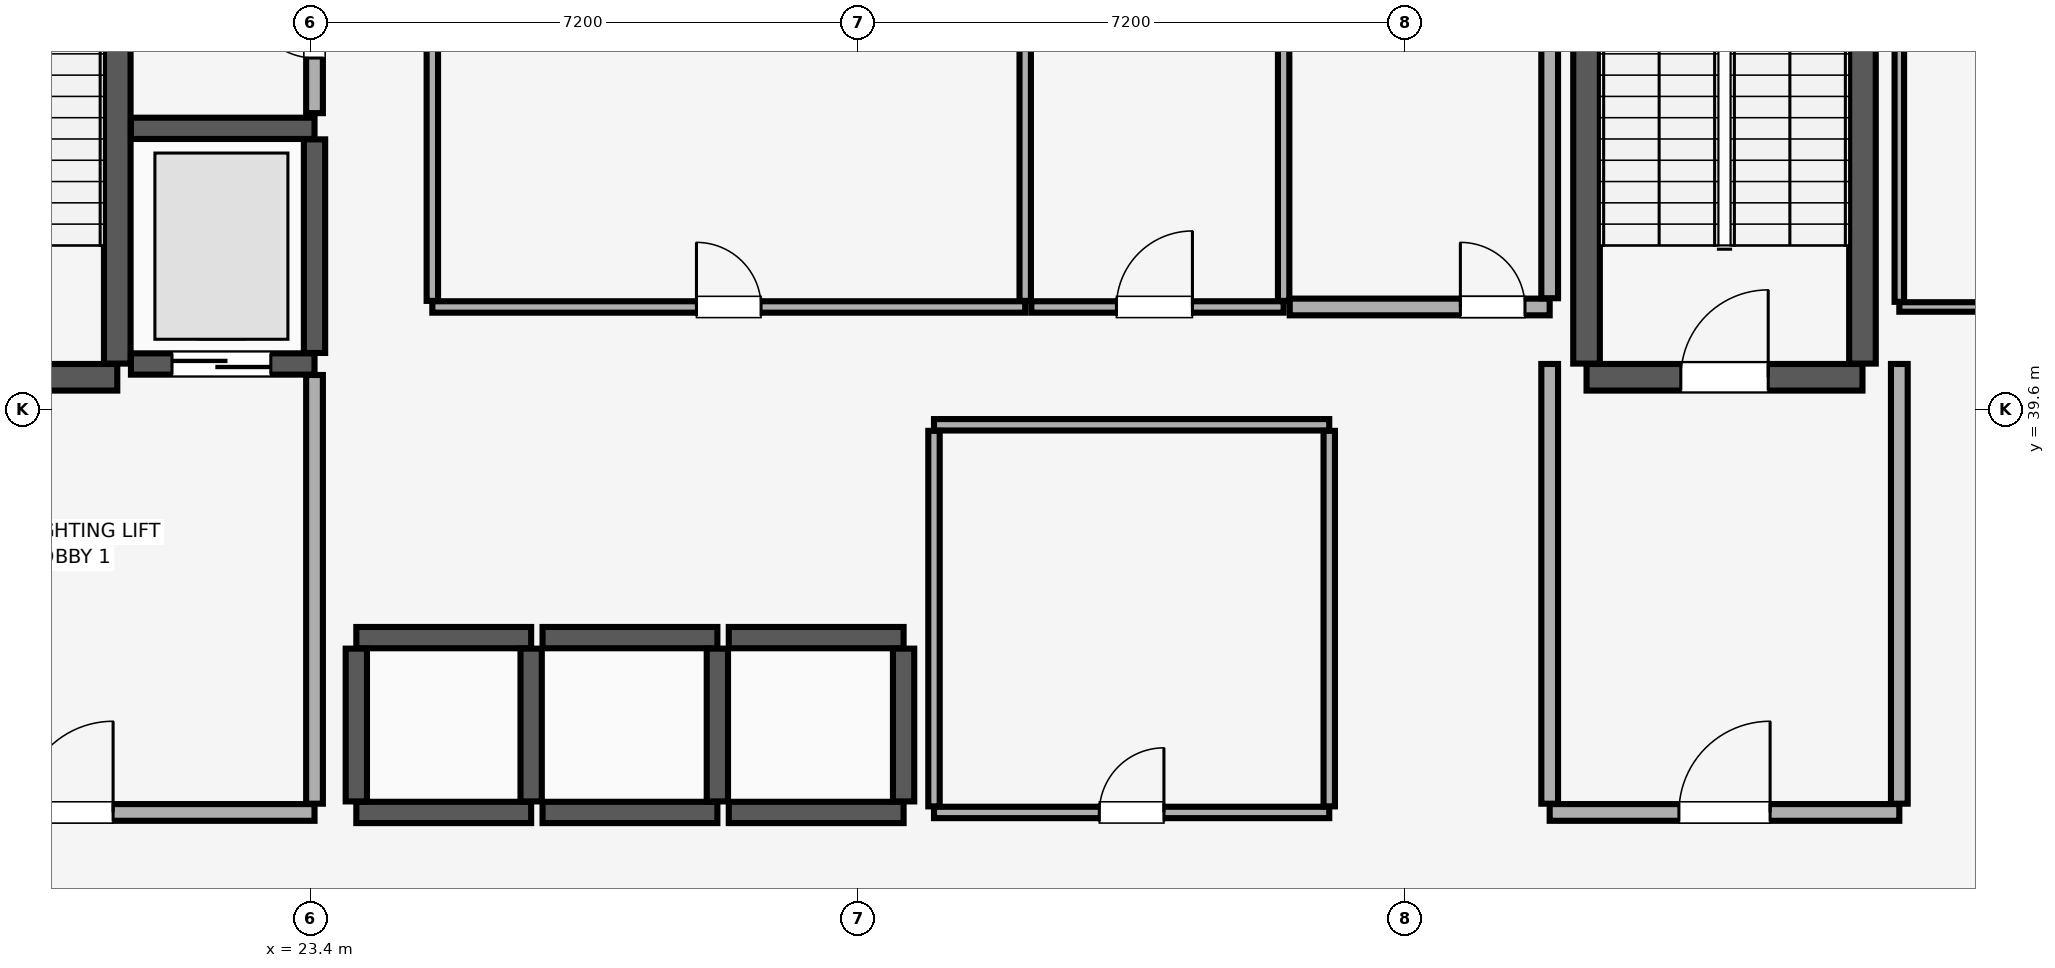
"""IFC4 building model, lengths in metres.
Left out: names, types, materials, properties, quantities, classifications, styles, units other than length and angle.
Written with IfcOpenShell. Run it as: python <this file> out.ifc"""

import sys

from ifc_helpers import new_model, si_unit, direction, frame, frame_2d, origin, place, context, subcontext, project, spatial, rectangle, extrude, element, fill, save


model = new_model("IFC4")
c1 = context("Model", 3, precision=1e-05, world=origin(), true_north=direction((0.0, 1.0)))
c2 = subcontext(c1, "Body", "Model", "MODEL_VIEW")
j1 = project(units=[si_unit("LENGTHUNIT", "METRE"), si_unit("PLANEANGLEUNIT", "RADIAN")], contexts=[c1])
p1 = place(None, origin())
s1 = spatial("IfcSite", under=j1, at=p1, CompositionType="ELEMENT")
p2 = place(p1, origin())
s2 = spatial("IfcBuilding", under=s1, at=p2, CompositionType="ELEMENT")
p3 = place(p2, frame((0.0, 0.0, 135.35)))
s3 = spatial("IfcBuildingStorey", under=s2, at=p3, CompositionType="ELEMENT", Elevation=135.35)
p4 = place(p3, frame((16.655, 40.025, 0.0), z_axis=(0.0, 0.0, 1.0), x_axis=(1.0, 0.0, 0.0)))
e1 = element("IfcWall", 1, at=p4, inside=s3, PredefinedType="SHEAR", context=c2, shape_type="SweptSolid", body=[
    extrude(rectangle(XDim=4.2, YDim=0.35, at=frame_2d((2.1, 0.0))), origin(), (0.0, 0.0, 1.0), 3.56),
])
p5 = place(p4, frame((1.81, 0.0, 0.0)))
e2 = element("IfcOpeningElement", 2, at=p5, cuts=e1, PredefinedType="OPENING", context=c2, shape_type="SweptSolid", body=[
    extrude(rectangle(XDim=1.15, YDim=2.15, at=frame_2d((0.575, 1.075))), frame((0.0, 0.185, 0.0), z_axis=(0.0, -1.0, 0.0), x_axis=(1.0, 0.0, 0.0)), (0.0, 0.0, 1.0), 0.37),
])
p6 = place(p3, frame((20.855, 40.205, 0.0), z_axis=(0.0, 0.0, 1.0), x_axis=(0.0, 1.0, 0.0)))
e3 = element("IfcWall", 3, at=p6, inside=s3, PredefinedType="SHEAR", context=c2, shape_type="SweptSolid", body=[
    extrude(rectangle(XDim=8.09, YDim=0.35, at=frame_2d((4.045, 0.0))), origin(), (0.0, 0.0, 1.0), 3.56),
])
p7 = place(p3, frame((40.185, 40.025, 0.0), z_axis=(0.0, 0.0, 1.0), x_axis=(1.0, 0.0, 0.0)))
e4 = element("IfcWall", 4, at=p7, inside=s3, PredefinedType="SHEAR", context=c2, shape_type="SweptSolid", body=[
    extrude(rectangle(XDim=3.63, YDim=0.35, at=frame_2d((1.815, 0.0))), origin(), (0.0, 0.0, 1.0), 3.56),
])
p8 = place(p7, frame((1.24, 0.0, 0.0)))
e5 = element("IfcOpeningElement", 5, at=p8, cuts=e4, PredefinedType="OPENING", context=c2, shape_type="SweptSolid", body=[
    extrude(rectangle(XDim=1.15, YDim=2.15, at=frame_2d((0.575, 1.075))), frame((0.0, 0.185, 0.0), z_axis=(0.0, -1.0, 0.0), x_axis=(1.0, 0.0, 0.0)), (0.0, 0.0, 1.0), 0.37),
])
for number, where, z_axis, x_axis in (
    (6, (40.185, 40.205, 0.0), (0.0, 0.0, 1.0), (0.0, 1.0, 0.0)),
    (7, (43.815, 40.205, 0.0), (0.0, 0.0, 1.0), (0.0, 1.0, 0.0)),
):
    element("IfcWall", number, at=place(p3, frame(where, z_axis=z_axis, x_axis=x_axis)), inside=s3, PredefinedType="SHEAR", context=c2, shape_type="SweptSolid", body=[
        extrude(rectangle(XDim=8.09, YDim=0.35, at=frame_2d((4.045, 0.0))), origin(), (0.0, 0.0, 1.0), 3.56),
    ])
for number, where, z_axis, x_axis in (
    (8, (24.0, 34.3, 0.0), (0.0, 0.0, 1.0), (1.0, 0.0, 0.0)),
    (9, (24.0, 36.6, 0.0), (0.0, 0.0, 1.0), (1.0, 0.0, 0.0)),
):
    element("IfcWall", number, at=place(p3, frame(where, z_axis=z_axis, x_axis=x_axis)), inside=s3, PredefinedType="SHEAR", context=c2, shape_type="SweptSolid", body=[
        extrude(rectangle(XDim=2.3, YDim=0.28, at=frame_2d((1.15, 0.0))), origin(), (0.0, 0.0, 1.0), 3.56),
    ])
for number, where, z_axis, x_axis in (
    (10, (24.0, 34.445, 0.0), (0.0, 0.0, 1.0), (0.0, 1.0, 0.0)),
    (11, (26.3, 34.445, 0.0), (0.0, 0.0, 1.0), (0.0, 1.0, 0.0)),
):
    element("IfcWall", number, at=place(p3, frame(where, z_axis=z_axis, x_axis=x_axis)), inside=s3, PredefinedType="SHEAR", context=c2, shape_type="SweptSolid", body=[
        extrude(rectangle(XDim=2.01, YDim=0.28, at=frame_2d((1.005, 0.0))), origin(), (0.0, 0.0, 1.0), 3.56),
    ])
for number, where, z_axis, x_axis in (
    (12, (26.45, 34.3, 0.0), (0.0, 0.0, 1.0), (1.0, 0.0, 0.0)),
    (13, (26.45, 36.6, 0.0), (0.0, 0.0, 1.0), (1.0, 0.0, 0.0)),
):
    element("IfcWall", number, at=place(p3, frame(where, z_axis=z_axis, x_axis=x_axis)), inside=s3, PredefinedType="SHEAR", context=c2, shape_type="SweptSolid", body=[
        extrude(rectangle(XDim=2.3, YDim=0.28, at=frame_2d((1.15, 0.0))), origin(), (0.0, 0.0, 1.0), 3.56),
    ])
p9 = place(p3, frame((28.75, 34.445, 0.0), z_axis=(0.0, 0.0, 1.0), x_axis=(0.0, 1.0, 0.0)))
e14 = element("IfcWall", 14, at=p9, inside=s3, PredefinedType="SHEAR", context=c2, shape_type="SweptSolid", body=[
    extrude(rectangle(XDim=2.01, YDim=0.28, at=frame_2d((1.005, 0.0))), origin(), (0.0, 0.0, 1.0), 3.56),
])
for number, where, z_axis, x_axis in (
    (15, (28.9, 34.3, 0.0), (0.0, 0.0, 1.0), (1.0, 0.0, 0.0)),
    (16, (28.9, 36.6, 0.0), (0.0, 0.0, 1.0), (1.0, 0.0, 0.0)),
):
    element("IfcWall", number, at=place(p3, frame(where, z_axis=z_axis, x_axis=x_axis)), inside=s3, PredefinedType="SHEAR", context=c2, shape_type="SweptSolid", body=[
        extrude(rectangle(XDim=2.3, YDim=0.28, at=frame_2d((1.15, 0.0))), origin(), (0.0, 0.0, 1.0), 3.56),
    ])
p10 = place(p3, frame((31.2, 34.445, 0.0), z_axis=(0.0, 0.0, 1.0), x_axis=(0.0, 1.0, 0.0)))
e17 = element("IfcWall", 17, at=p10, inside=s3, PredefinedType="SHEAR", context=c2, shape_type="SweptSolid", body=[
    extrude(rectangle(XDim=2.01, YDim=0.28, at=frame_2d((1.005, 0.0))), origin(), (0.0, 0.0, 1.0), 3.56),
])
p11 = place(p3, frame((21.035, 40.2, 0.0), z_axis=(0.0, 0.0, 1.0), x_axis=(1.0, 0.0, 0.0)))
e18 = element("IfcWall", 18, at=p11, inside=s3, PredefinedType="SHEAR", context=c2, shape_type="SweptSolid", body=[
    extrude(rectangle(XDim=2.415, YDim=0.28, at=frame_2d((1.208, 0.0))), origin(), (0.0, 0.0, 1.0), 3.56),
])
p12 = place(p11, frame((0.54, 0.0, 0.0)))
e19 = element("IfcOpeningElement", 19, at=p12, cuts=e18, PredefinedType="OPENING", context=c2, shape_type="SweptSolid", body=[
    extrude(rectangle(XDim=1.3, YDim=2.3, at=frame_2d((0.65, 1.15))), frame((0.0, 0.15, 0.0), z_axis=(0.0, -1.0, 0.0), x_axis=(1.0, 0.0, 0.0)), (0.0, 0.0, 1.0), 0.3),
])
p13 = place(p3, frame((21.035, 43.3, 0.0), z_axis=(0.0, 0.0, 1.0), x_axis=(1.0, 0.0, 0.0)))
e20 = element("IfcWall", 20, at=p13, inside=s3, PredefinedType="SHEAR", context=c2, shape_type="SweptSolid", body=[
    extrude(rectangle(XDim=2.415, YDim=0.28, at=frame_2d((1.208, 0.0))), origin(), (0.0, 0.0, 1.0), 3.56),
])
p14 = place(p3, frame((23.45, 40.345, 0.0), z_axis=(0.0, 0.0, 1.0), x_axis=(0.0, 1.0, 0.0)))
e21 = element("IfcWall", 21, at=p14, inside=s3, PredefinedType="SHEAR", context=c2, shape_type="SweptSolid", body=[
    extrude(rectangle(XDim=2.81, YDim=0.28, at=frame_2d((1.405, 0.0))), origin(), (0.0, 0.0, 1.0), 3.56),
])
p15 = place(p3, frame((17.4, 34.3, 0.0), z_axis=(0.0, 0.0, 1.0), x_axis=(1.0, 0.0, 0.0)))
e22 = element("IfcWall", 22, at=p15, inside=s3, PredefinedType="PARTITIONING", context=c2, shape_type="SweptSolid", body=[
    extrude(rectangle(XDim=6.05, YDim=0.22, at=frame_2d((3.025, 0.0))), origin(), (0.0, 0.0, 1.0), 3.56),
])
p16 = place(p15, frame((2.2, 0.0, 0.0)))
e23 = element("IfcOpeningElement", 23, at=p16, cuts=e22, PredefinedType="OPENING", context=c2, shape_type="SweptSolid", body=[
    extrude(rectangle(XDim=1.2, YDim=2.15, at=frame_2d((0.6, 1.075))), frame((0.0, 0.12, 0.0), z_axis=(0.0, -1.0, 0.0), x_axis=(1.0, 0.0, 0.0)), (0.0, 0.0, 1.0), 0.24),
])
p17 = place(p3, frame((23.45, 34.415, 0.0), z_axis=(0.0, 0.0, 1.0), x_axis=(0.0, 1.0, 0.0)))
e24 = element("IfcWall", 24, at=p17, inside=s3, PredefinedType="PARTITIONING", context=c2, shape_type="SweptSolid", body=[
    extrude(rectangle(XDim=5.64, YDim=0.22, at=frame_2d((2.82, 0.0))), origin(), (0.0, 0.0, 1.0), 3.56),
])
p18 = place(p3, frame((39.7, 34.3, 0.0), z_axis=(0.0, 0.0, 1.0), x_axis=(1.0, 0.0, 0.0)))
e25 = element("IfcWall", 25, at=p18, inside=s3, PredefinedType="PARTITIONING", context=c2, shape_type="SweptSolid", body=[
    extrude(rectangle(XDim=4.6, YDim=0.22, at=frame_2d((2.3, 0.0))), origin(), (0.0, 0.0, 1.0), 3.56),
])
p19 = place(p18, frame((1.7, 0.0, 0.0)))
e26 = element("IfcOpeningElement", 26, at=p19, cuts=e25, PredefinedType="OPENING", context=c2, shape_type="SweptSolid", body=[
    extrude(rectangle(XDim=1.2, YDim=2.15, at=frame_2d((0.6, 1.075))), frame((0.0, 0.12, 0.0), z_axis=(0.0, -1.0, 0.0), x_axis=(1.0, 0.0, 0.0)), (0.0, 0.0, 1.0), 0.24),
])
for number, where, z_axis, x_axis in (
    (27, (39.7, 34.415, 0.0), (0.0, 0.0, 1.0), (0.0, 1.0, 0.0)),
    (28, (44.3, 34.415, 0.0), (0.0, 0.0, 1.0), (0.0, 1.0, 0.0)),
):
    element("IfcWall", number, at=place(p3, frame(where, z_axis=z_axis, x_axis=x_axis)), inside=s3, PredefinedType="PARTITIONING", context=c2, shape_type="SweptSolid", body=[
        extrude(rectangle(XDim=5.785, YDim=0.22, at=frame_2d((2.893, 0.0))), origin(), (0.0, 0.0, 1.0), 3.56),
    ])
p20 = place(p3, frame((23.45, 43.5, 0.0), z_axis=(0.0, 0.0, 1.0), x_axis=(0.0, 1.0, 0.0)))
e29 = element("IfcWall", 29, at=p20, inside=s3, PredefinedType="PARTITIONING", context=c2, shape_type="SweptSolid", body=[
    extrude(rectangle(XDim=2.235, YDim=0.22, at=frame_2d((1.118, 0.0))), origin(), (0.0, 0.0, 1.0), 3.56),
])
p21 = place(p20, frame((0.725, 0.0, 0.0)))
e30 = element("IfcOpeningElement", 30, at=p21, cuts=e29, PredefinedType="OPENING", context=c2, shape_type="SweptSolid", body=[
    extrude(rectangle(XDim=0.85, YDim=2.1, at=frame_2d((0.425, 1.05))), frame((0.0, 0.12, 0.0), z_axis=(0.0, -1.0, 0.0), x_axis=(1.0, 0.0, 0.0)), (0.0, 0.0, 1.0), 0.24),
])
p22 = place(p3, frame((31.6, 34.3, 0.0), z_axis=(0.0, 0.0, 1.0), x_axis=(1.0, 0.0, 0.0)))
e31 = element("IfcWall", 31, at=p22, inside=s3, PredefinedType="PARTITIONING", context=c2, shape_type="SweptSolid", body=[
    extrude(rectangle(XDim=5.2, YDim=0.15, at=frame_2d((2.6, 0.0))), origin(), (0.0, 0.0, 1.0), 3.56),
])
p23 = place(p22, frame((2.175, 0.0, 0.0)))
e32 = element("IfcOpeningElement", 32, at=p23, cuts=e31, PredefinedType="OPENING", context=c2, shape_type="SweptSolid", body=[
    extrude(rectangle(XDim=0.85, YDim=2.1, at=frame_2d((0.425, 1.05))), frame((0.0, 0.085, 0.0), z_axis=(0.0, -1.0, 0.0), x_axis=(1.0, 0.0, 0.0)), (0.0, 0.0, 1.0), 0.17),
])
p24 = place(p3, frame((31.6, 39.4, 0.0), z_axis=(0.0, 0.0, 1.0), x_axis=(1.0, 0.0, 0.0)))
e33 = element("IfcWall", 33, at=p24, inside=s3, PredefinedType="PARTITIONING", context=c2, shape_type="SweptSolid", body=[
    extrude(rectangle(XDim=5.2, YDim=0.15, at=frame_2d((2.6, 0.0))), origin(), (0.0, 0.0, 1.0), 3.56),
])
for number, where, z_axis, x_axis in (
    (34, (31.6, 34.38, 0.0), (0.0, 0.0, 1.0), (0.0, 1.0, 0.0)),
    (35, (36.8, 34.38, 0.0), (0.0, 0.0, 1.0), (0.0, 1.0, 0.0)),
):
    element("IfcWall", number, at=place(p3, frame(where, z_axis=z_axis, x_axis=x_axis)), inside=s3, PredefinedType="PARTITIONING", context=c2, shape_type="SweptSolid", body=[
        extrude(rectangle(XDim=4.94, YDim=0.15, at=frame_2d((2.47, 0.0))), origin(), (0.0, 0.0, 1.0), 3.56),
    ])
p25 = place(p3, frame((25.0, 40.95, 0.0), z_axis=(0.0, 0.0, 1.0), x_axis=(1.0, 0.0, 0.0)))
e36 = element("IfcWall", 36, at=p25, inside=s3, PredefinedType="PARTITIONING", context=c2, shape_type="SweptSolid", body=[
    extrude(rectangle(XDim=7.8, YDim=0.15, at=frame_2d((3.9, 0.0))), origin(), (0.0, 0.0, 1.0), 3.56),
])
p26 = place(p25, frame((3.475, 0.0, 0.0)))
e37 = element("IfcOpeningElement", 37, at=p26, cuts=e36, PredefinedType="OPENING", context=c2, shape_type="SweptSolid", body=[
    extrude(rectangle(XDim=0.85, YDim=2.1, at=frame_2d((0.425, 1.05))), frame((0.0, 0.085, 0.0), z_axis=(0.0, -1.0, 0.0), x_axis=(1.0, 0.0, 0.0)), (0.0, 0.0, 1.0), 0.17),
])
for number, where, z_axis, x_axis in (
    (38, (25.0, 41.03, 0.0), (0.0, 0.0, 1.0), (0.0, 1.0, 0.0)),
    (39, (32.8, 41.03, 0.0), (0.0, 0.0, 1.0), (0.0, 1.0, 0.0)),
):
    element("IfcWall", number, at=place(p3, frame(where, z_axis=z_axis, x_axis=x_axis)), inside=s3, PredefinedType="PARTITIONING", context=c2, shape_type="SweptSolid", body=[
        extrude(rectangle(XDim=7.82, YDim=0.15, at=frame_2d((3.91, 0.0))), origin(), (0.0, 0.0, 1.0), 3.56),
    ])
p27 = place(p3, frame((32.88, 40.95, 0.0), z_axis=(0.0, 0.0, 1.0), x_axis=(1.0, 0.0, 0.0)))
e40 = element("IfcWall", 40, at=p27, inside=s3, PredefinedType="PARTITIONING", context=c2, shape_type="SweptSolid", body=[
    extrude(rectangle(XDim=3.32, YDim=0.15, at=frame_2d((1.66, 0.0))), origin(), (0.0, 0.0, 1.0), 3.56),
])
p28 = place(p27, frame((1.12, 0.0, 0.0)))
e41 = element("IfcOpeningElement", 41, at=p28, cuts=e40, PredefinedType="OPENING", context=c2, shape_type="SweptSolid", body=[
    extrude(rectangle(XDim=1.0, YDim=2.15, at=frame_2d((0.5, 1.075))), frame((0.0, 0.085, 0.0), z_axis=(0.0, -1.0, 0.0), x_axis=(1.0, 0.0, 0.0)), (0.0, 0.0, 1.0), 0.17),
])
p29 = place(p3, frame((36.2, 41.03, 0.0), z_axis=(0.0, 0.0, 1.0), x_axis=(0.0, 1.0, 0.0)))
e42 = element("IfcWall", 42, at=p29, inside=s3, PredefinedType="PARTITIONING", context=c2, shape_type="SweptSolid", body=[
    extrude(rectangle(XDim=7.82, YDim=0.15, at=frame_2d((3.91, 0.0))), origin(), (0.0, 0.0, 1.0), 3.56),
])
p30 = place(p3, frame((36.28, 40.95, 0.0), z_axis=(0.0, 0.0, 1.0), x_axis=(1.0, 0.0, 0.0)))
e43 = element("IfcWall", 43, at=p30, inside=s3, PredefinedType="PARTITIONING", context=c2, shape_type="SweptSolid", body=[
    extrude(rectangle(XDim=3.42, YDim=0.22, at=frame_2d((1.71, 0.0))), origin(), (0.0, 0.0, 1.0), 3.56),
])
p31 = place(p30, frame((2.245, 0.0, 0.0)))
e44 = element("IfcOpeningElement", 44, at=p31, cuts=e43, PredefinedType="OPENING", context=c2, shape_type="SweptSolid", body=[
    extrude(rectangle(XDim=0.85, YDim=2.1, at=frame_2d((0.425, 1.05))), frame((0.0, 0.12, 0.0), z_axis=(0.0, -1.0, 0.0), x_axis=(1.0, 0.0, 0.0)), (0.0, 0.0, 1.0), 0.24),
])
p32 = place(p3, frame((39.7, 41.065, 0.0), z_axis=(0.0, 0.0, 1.0), x_axis=(0.0, 1.0, 0.0)))
e45 = element("IfcWall", 45, at=p32, inside=s3, PredefinedType="PARTITIONING", context=c2, shape_type="SweptSolid", body=[
    extrude(rectangle(XDim=7.785, YDim=0.22, at=frame_2d((3.893, 0.0))), origin(), (0.0, 0.0, 1.0), 3.56),
])
p33 = place(p3, frame((44.3, 40.95, 0.0), z_axis=(0.0, 0.0, 1.0), x_axis=(1.0, 0.0, 0.0)))
e46 = element("IfcWall", 46, at=p33, inside=s3, PredefinedType="PARTITIONING", context=c2, shape_type="SweptSolid", body=[
    extrude(rectangle(XDim=4.6, YDim=0.125, at=frame_2d((2.3, 0.0))), origin(), (0.0, 0.0, 1.0), 3.56),
])
p34 = place(p33, frame((2.85, 0.0, 0.0)))
e47 = element("IfcOpeningElement", 47, at=p34, cuts=e46, PredefinedType="OPENING", context=c2, shape_type="SweptSolid", body=[
    extrude(rectangle(XDim=0.9, YDim=2.1, at=frame_2d((0.45, 1.05))), frame((0.0, 0.073, 0.0), z_axis=(0.0, -1.0, 0.0), x_axis=(1.0, 0.0, 0.0)), (0.0, 0.0, 1.0), 0.145),
])
p35 = place(p3, frame((44.3, 41.018, 0.0), z_axis=(0.0, 0.0, 1.0), x_axis=(0.0, 1.0, 0.0)))
e48 = element("IfcWall", 48, at=p35, inside=s3, PredefinedType="PARTITIONING", context=c2, shape_type="SweptSolid", body=[
    extrude(rectangle(XDim=3.515, YDim=0.125, at=frame_2d((1.757, 0.0))), origin(), (0.0, 0.0, 1.0), 3.56),
])
p36 = place(p8, origin())
e49 = element("IfcDoor", 49, at=p36, inside=s3, OperationType="SINGLE_SWING_RIGHT", PredefinedType="DOOR", context=c2, shape_type="SweptSolid", body=[
    extrude(rectangle(XDim=1.15, YDim=2.15, at=frame_2d((0.575, 1.075))), frame((0.0, 0.025, 0.0), z_axis=(0.0, -1.0, 0.0), x_axis=(1.0, 0.0, 0.0)), (0.0, 0.0, 1.0), 0.05),
])
fill(e5, e49)
p37 = place(p12, origin())
e50 = element("IfcDoor", 50, at=p37, inside=s3, OperationType="DOUBLE_DOOR_SLIDING", PredefinedType="DOOR", context=c2, shape_type="SweptSolid", body=[
    extrude(rectangle(XDim=1.3, YDim=2.3, at=frame_2d((0.65, 1.15))), frame((0.0, 0.025, 0.0), z_axis=(0.0, -1.0, 0.0), x_axis=(1.0, 0.0, 0.0)), (0.0, 0.0, 1.0), 0.05),
])
fill(e19, e50)
p38 = place(p16, origin())
e51 = element("IfcDoor", 51, at=p38, inside=s3, OperationType="SINGLE_SWING_RIGHT", PredefinedType="DOOR", context=c2, shape_type="SweptSolid", body=[
    extrude(rectangle(XDim=1.2, YDim=2.15, at=frame_2d((0.6, 1.075))), frame((0.0, 0.025, 0.0), z_axis=(0.0, -1.0, 0.0), x_axis=(1.0, 0.0, 0.0)), (0.0, 0.0, 1.0), 0.05),
])
fill(e23, e51)
p39 = place(p19, origin())
e52 = element("IfcDoor", 52, at=p39, inside=s3, OperationType="SINGLE_SWING_RIGHT", PredefinedType="DOOR", context=c2, shape_type="SweptSolid", body=[
    extrude(rectangle(XDim=1.2, YDim=2.15, at=frame_2d((0.6, 1.075))), frame((0.0, 0.025, 0.0), z_axis=(0.0, -1.0, 0.0), x_axis=(1.0, 0.0, 0.0)), (0.0, 0.0, 1.0), 0.05),
])
fill(e26, e52)
p40 = place(p21, origin())
e53 = element("IfcDoor", 53, at=p40, inside=s3, OperationType="SINGLE_SWING_RIGHT", PredefinedType="DOOR", context=c2, shape_type="SweptSolid", body=[
    extrude(rectangle(XDim=0.85, YDim=2.1, at=frame_2d((0.425, 1.05))), frame((0.0, 0.025, 0.0), z_axis=(0.0, -1.0, 0.0), x_axis=(1.0, 0.0, 0.0)), (0.0, 0.0, 1.0), 0.05),
])
fill(e30, e53)
p41 = place(p23, origin())
e54 = element("IfcDoor", 54, at=p41, inside=s3, OperationType="SINGLE_SWING_RIGHT", PredefinedType="DOOR", context=c2, shape_type="SweptSolid", body=[
    extrude(rectangle(XDim=0.85, YDim=2.1, at=frame_2d((0.425, 1.05))), frame((0.0, 0.025, 0.0), z_axis=(0.0, -1.0, 0.0), x_axis=(1.0, 0.0, 0.0)), (0.0, 0.0, 1.0), 0.05),
])
fill(e32, e54)
p42 = place(p26, origin())
e55 = element("IfcDoor", 55, at=p42, inside=s3, OperationType="SINGLE_SWING_LEFT", PredefinedType="DOOR", context=c2, shape_type="SweptSolid", body=[
    extrude(rectangle(XDim=0.85, YDim=2.1, at=frame_2d((0.425, 1.05))), frame((0.0, 0.025, 0.0), z_axis=(0.0, -1.0, 0.0), x_axis=(1.0, 0.0, 0.0)), (0.0, 0.0, 1.0), 0.05),
])
fill(e37, e55)
p43 = place(p28, origin())
e56 = element("IfcDoor", 56, at=p43, inside=s3, OperationType="SINGLE_SWING_RIGHT", PredefinedType="DOOR", context=c2, shape_type="SweptSolid", body=[
    extrude(rectangle(XDim=1.0, YDim=2.15, at=frame_2d((0.5, 1.075))), frame((0.0, 0.025, 0.0), z_axis=(0.0, -1.0, 0.0), x_axis=(1.0, 0.0, 0.0)), (0.0, 0.0, 1.0), 0.05),
])
fill(e41, e56)
p44 = place(p31, origin())
e57 = element("IfcDoor", 57, at=p44, inside=s3, OperationType="SINGLE_SWING_LEFT", PredefinedType="DOOR", context=c2, shape_type="SweptSolid", body=[
    extrude(rectangle(XDim=0.85, YDim=2.1, at=frame_2d((0.425, 1.05))), frame((0.0, 0.025, 0.0), z_axis=(0.0, -1.0, 0.0), x_axis=(1.0, 0.0, 0.0)), (0.0, 0.0, 1.0), 0.05),
])
fill(e44, e57)
save(model, sys.argv[1])
